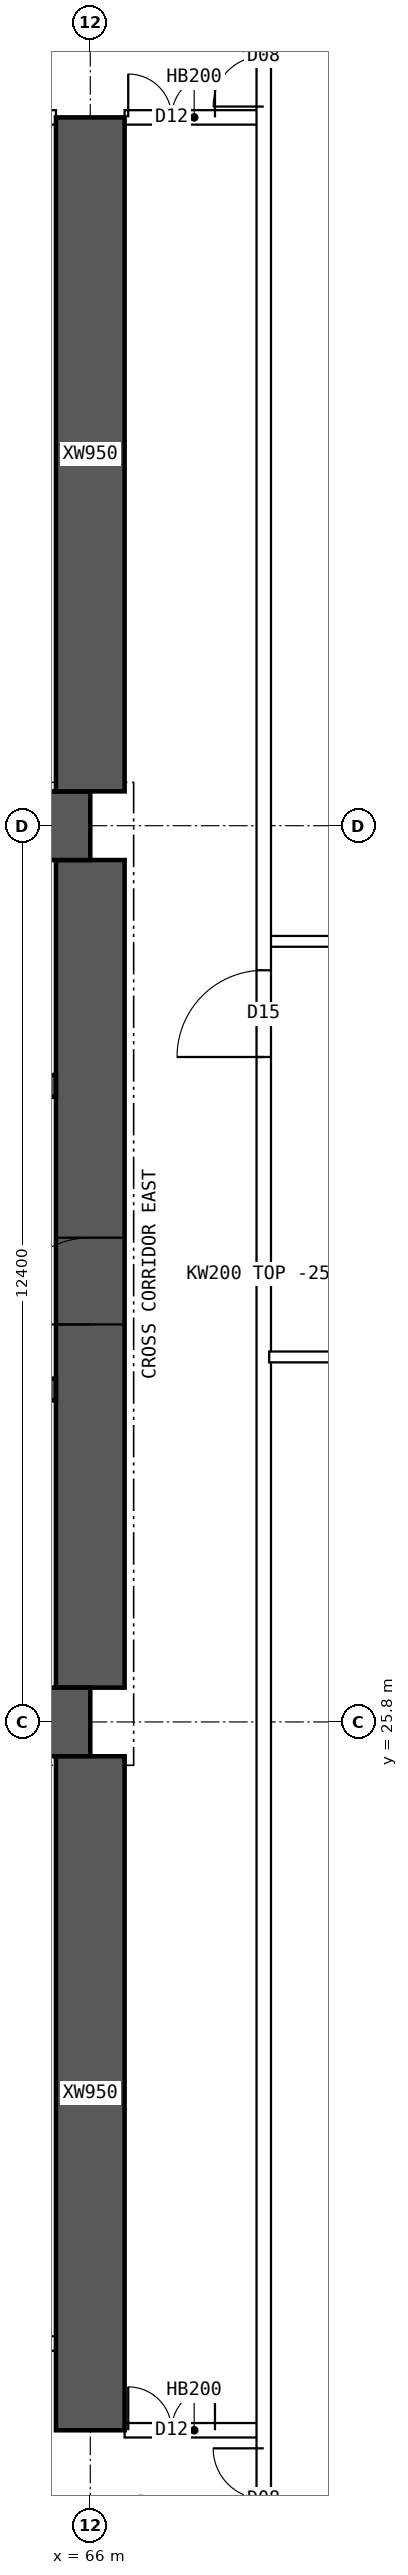
"""IFC4 building model, lengths in metres.
Left out: names, types, materials, properties, quantities, classifications, styles, units other than length and angle.
Written with IfcOpenShell. Run it as: python <this file> out.ifc"""

import sys

from ifc_helpers import new_model, si_unit, direction, frame, frame_2d, origin, place, context, subcontext, project, spatial, polyline, rectangle, outline, extrude, element, fill, save


model = new_model("IFC4")
c1 = context("Model", 3, precision=1e-05, world=origin(), true_north=direction((0.0, 1.0)))
c2 = subcontext(c1, "Body", "Model", "MODEL_VIEW")
j1 = project(units=[si_unit("LENGTHUNIT", "METRE"), si_unit("PLANEANGLEUNIT", "RADIAN")], contexts=[c1])
p1 = place(None, origin())
s1 = spatial("IfcSite", under=j1, at=p1, CompositionType="ELEMENT")
p2 = place(p1, origin())
s2 = spatial("IfcBuilding", under=s1, at=p2, CompositionType="ELEMENT")
p3 = place(p2, frame((0.0, 0.0, 106.9)))
s3 = spatial("IfcBuildingStorey", under=s2, at=p3, CompositionType="ELEMENT", Elevation=106.9)
for number, where, z_axis, x_axis in (
    (1, (18.0, 25.8, 0.0), (0.0, 0.0, 1.0), (1.0, 0.0, 0.0)),
    (2, (18.0, 38.2, 0.0), (0.0, 0.0, 1.0), (1.0, 0.0, 0.0)),
):
    element("IfcWall", number, at=place(p3, frame(where, z_axis=z_axis, x_axis=x_axis)), inside=s3, PredefinedType="SHEAR", context=c2, shape_type="SweptSolid", body=[
        extrude(rectangle(XDim=48.0, YDim=0.95, at=frame_2d((24.0, 0.0))), origin(), (0.0, 0.0, 1.0), 3.75),
    ])
p4 = place(p3, frame((66.0, 26.275, 0.0), z_axis=(0.0, 0.0, 1.0), x_axis=(0.0, 1.0, 0.0)))
e3 = element("IfcWall", 3, at=p4, inside=s3, PredefinedType="SHEAR", context=c2, shape_type="SweptSolid", body=[
    extrude(rectangle(XDim=11.45, YDim=0.95, at=frame_2d((5.725, 0.0))), origin(), (0.0, 0.0, 1.0), 3.75),
])
p5 = place(p4, frame((5.025, 0.0, 0.0)))
e4 = element("IfcOpeningElement", 4, at=p5, cuts=e3, PredefinedType="OPENING", context=c2, shape_type="SweptSolid", body=[
    extrude(rectangle(XDim=1.2, YDim=2.1, at=frame_2d((0.6, 1.05))), frame((0.0, 0.485, 0.0), z_axis=(0.0, -1.0, 0.0), x_axis=(1.0, 0.0, 0.0)), (0.0, 0.0, 1.0), 0.97),
])
p6 = place(p3, frame((18.475, 30.4, 0.0), z_axis=(0.0, 0.0, 1.0), x_axis=(1.0, 0.0, 0.0)))
e5 = element("IfcWall", 5, at=p6, inside=s3, PredefinedType="SHEAR", context=c2, shape_type="SweptSolid", body=[
    extrude(rectangle(XDim=47.05, YDim=0.3, at=frame_2d((23.525, 0.0))), origin(), (0.0, 0.0, 1.0), 3.75),
])
p7 = place(p6, frame((0.4, 0.0, 0.0)))
e6 = element("IfcOpeningElement", 6, at=p7, cuts=e5, PredefinedType="OPENING", context=c2, shape_type="SweptSolid", body=[
    extrude(rectangle(XDim=1.0, YDim=2.1, at=frame_2d((0.5, 1.05))), frame((0.0, 0.16, 0.0), z_axis=(0.0, -1.0, 0.0), x_axis=(1.0, 0.0, 0.0)), (0.0, 0.0, 1.0), 0.32),
])
p8 = place(p6, frame((45.65, 0.0, 0.0)))
e7 = element("IfcOpeningElement", 7, at=p8, cuts=e5, PredefinedType="OPENING", context=c2, shape_type="SweptSolid", body=[
    extrude(rectangle(XDim=1.0, YDim=2.1, at=frame_2d((0.5, 1.05))), frame((0.0, 0.16, 0.0), z_axis=(0.0, -1.0, 0.0), x_axis=(1.0, 0.0, 0.0)), (0.0, 0.0, 1.0), 0.32),
])
p9 = place(p6, frame((8.275, 0.0, 0.0)))
e8 = element("IfcOpeningElement", 8, at=p9, cuts=e5, PredefinedType="OPENING", context=c2, shape_type="SweptSolid", body=[
    extrude(rectangle(XDim=1.1, YDim=2.1, at=frame_2d((0.55, 1.05))), frame((0.0, 0.16, 0.0), z_axis=(0.0, -1.0, 0.0), x_axis=(1.0, 0.0, 0.0)), (0.0, 0.0, 1.0), 0.32),
])
p10 = place(p6, frame((10.875, 0.0, 0.0)))
e9 = element("IfcOpeningElement", 9, at=p10, cuts=e5, PredefinedType="OPENING", context=c2, shape_type="SweptSolid", body=[
    extrude(rectangle(XDim=1.1, YDim=2.1, at=frame_2d((0.55, 1.05))), frame((0.0, 0.16, 0.0), z_axis=(0.0, -1.0, 0.0), x_axis=(1.0, 0.0, 0.0)), (0.0, 0.0, 1.0), 0.32),
])
p11 = place(p6, frame((13.475, 0.0, 0.0)))
e10 = element("IfcOpeningElement", 10, at=p11, cuts=e5, PredefinedType="OPENING", context=c2, shape_type="SweptSolid", body=[
    extrude(rectangle(XDim=1.1, YDim=2.1, at=frame_2d((0.55, 1.05))), frame((0.0, 0.16, 0.0), z_axis=(0.0, -1.0, 0.0), x_axis=(1.0, 0.0, 0.0)), (0.0, 0.0, 1.0), 0.32),
])
p12 = place(p6, frame((16.075, 0.0, 0.0)))
e11 = element("IfcOpeningElement", 11, at=p12, cuts=e5, PredefinedType="OPENING", context=c2, shape_type="SweptSolid", body=[
    extrude(rectangle(XDim=1.1, YDim=2.1, at=frame_2d((0.55, 1.05))), frame((0.0, 0.16, 0.0), z_axis=(0.0, -1.0, 0.0), x_axis=(1.0, 0.0, 0.0)), (0.0, 0.0, 1.0), 0.32),
])
p13 = place(p6, frame((18.85, 0.0, 0.0)))
e12 = element("IfcOpeningElement", 12, at=p13, cuts=e5, PredefinedType="OPENING", context=c2, shape_type="SweptSolid", body=[
    extrude(rectangle(XDim=0.9, YDim=2.1, at=frame_2d((0.45, 1.05))), frame((0.0, 0.16, 0.0), z_axis=(0.0, -1.0, 0.0), x_axis=(1.0, 0.0, 0.0)), (0.0, 0.0, 1.0), 0.32),
])
p14 = place(p6, frame((30.142, 0.0, 0.0)))
e13 = element("IfcOpeningElement", 13, at=p14, cuts=e5, PredefinedType="OPENING", context=c2, shape_type="SweptSolid", body=[
    extrude(rectangle(XDim=1.1, YDim=2.1, at=frame_2d((0.55, 1.05))), frame((0.0, 0.16, 0.0), z_axis=(0.0, -1.0, 0.0), x_axis=(1.0, 0.0, 0.0)), (0.0, 0.0, 1.0), 0.32),
])
p15 = place(p6, frame((33.675, 0.0, 0.0)))
e14 = element("IfcOpeningElement", 14, at=p15, cuts=e5, PredefinedType="OPENING", context=c2, shape_type="SweptSolid", body=[
    extrude(rectangle(XDim=1.1, YDim=2.1, at=frame_2d((0.55, 1.05))), frame((0.0, 0.16, 0.0), z_axis=(0.0, -1.0, 0.0), x_axis=(1.0, 0.0, 0.0)), (0.0, 0.0, 1.0), 0.32),
])
p16 = place(p6, frame((37.208, 0.0, 0.0)))
e15 = element("IfcOpeningElement", 15, at=p16, cuts=e5, PredefinedType="OPENING", context=c2, shape_type="SweptSolid", body=[
    extrude(rectangle(XDim=1.1, YDim=2.1, at=frame_2d((0.55, 1.05))), frame((0.0, 0.16, 0.0), z_axis=(0.0, -1.0, 0.0), x_axis=(1.0, 0.0, 0.0)), (0.0, 0.0, 1.0), 0.32),
])
p17 = place(p3, frame((18.475, 34.6, 0.0), z_axis=(0.0, 0.0, 1.0), x_axis=(1.0, 0.0, 0.0)))
e16 = element("IfcWall", 16, at=p17, inside=s3, PredefinedType="SHEAR", context=c2, shape_type="SweptSolid", body=[
    extrude(rectangle(XDim=47.05, YDim=0.3, at=frame_2d((23.525, 0.0))), origin(), (0.0, 0.0, 1.0), 3.75),
])
p18 = place(p17, frame((0.9, 0.0, 0.0)))
e17 = element("IfcOpeningElement", 17, at=p18, cuts=e16, PredefinedType="OPENING", context=c2, shape_type="SweptSolid", body=[
    extrude(rectangle(XDim=1.1, YDim=2.1, at=frame_2d((0.55, 1.05))), frame((0.0, 0.16, 0.0), z_axis=(0.0, -1.0, 0.0), x_axis=(1.0, 0.0, 0.0)), (0.0, 0.0, 1.0), 0.32),
])
p19 = place(p17, frame((45.05, 0.0, 0.0)))
e18 = element("IfcOpeningElement", 18, at=p19, cuts=e16, PredefinedType="OPENING", context=c2, shape_type="SweptSolid", body=[
    extrude(rectangle(XDim=1.1, YDim=2.1, at=frame_2d((0.55, 1.05))), frame((0.0, 0.16, 0.0), z_axis=(0.0, -1.0, 0.0), x_axis=(1.0, 0.0, 0.0)), (0.0, 0.0, 1.0), 0.32),
])
p20 = place(p17, frame((4.125, 0.0, 0.0)))
e19 = element("IfcOpeningElement", 19, at=p20, cuts=e16, PredefinedType="OPENING", context=c2, shape_type="SweptSolid", body=[
    extrude(rectangle(XDim=0.9, YDim=2.1, at=frame_2d((0.45, 1.05))), frame((0.0, 0.16, 0.0), z_axis=(0.0, -1.0, 0.0), x_axis=(1.0, 0.0, 0.0)), (0.0, 0.0, 1.0), 0.32),
])
p21 = place(p17, frame((42.025, 0.0, 0.0)))
e20 = element("IfcOpeningElement", 20, at=p21, cuts=e16, PredefinedType="OPENING", context=c2, shape_type="SweptSolid", body=[
    extrude(rectangle(XDim=0.9, YDim=2.1, at=frame_2d((0.45, 1.05))), frame((0.0, 0.16, 0.0), z_axis=(0.0, -1.0, 0.0), x_axis=(1.0, 0.0, 0.0)), (0.0, 0.0, 1.0), 0.32),
])
p22 = place(p17, frame((8.9, 0.0, 0.0)))
e21 = element("IfcOpeningElement", 21, at=p22, cuts=e16, PredefinedType="OPENING", context=c2, shape_type="SweptSolid", body=[
    extrude(rectangle(XDim=0.9, YDim=2.1, at=frame_2d((0.45, 1.05))), frame((0.0, 0.16, 0.0), z_axis=(0.0, -1.0, 0.0), x_axis=(1.0, 0.0, 0.0)), (0.0, 0.0, 1.0), 0.32),
])
p23 = place(p17, frame((12.874, 0.0, 0.0)))
e22 = element("IfcOpeningElement", 22, at=p23, cuts=e16, PredefinedType="OPENING", context=c2, shape_type="SweptSolid", body=[
    extrude(rectangle(XDim=0.9, YDim=2.1, at=frame_2d((0.45, 1.05))), frame((0.0, 0.16, 0.0), z_axis=(0.0, -1.0, 0.0), x_axis=(1.0, 0.0, 0.0)), (0.0, 0.0, 1.0), 0.32),
])
p24 = place(p17, frame((16.521, 0.0, 0.0)))
e23 = element("IfcOpeningElement", 23, at=p24, cuts=e16, PredefinedType="OPENING", context=c2, shape_type="SweptSolid", body=[
    extrude(rectangle(XDim=0.9, YDim=2.1, at=frame_2d((0.45, 1.05))), frame((0.0, 0.16, 0.0), z_axis=(0.0, -1.0, 0.0), x_axis=(1.0, 0.0, 0.0)), (0.0, 0.0, 1.0), 0.32),
])
p25 = place(p17, frame((20.28, 0.0, 0.0)))
e24 = element("IfcOpeningElement", 24, at=p25, cuts=e16, PredefinedType="OPENING", context=c2, shape_type="SweptSolid", body=[
    extrude(rectangle(XDim=0.9, YDim=2.1, at=frame_2d((0.45, 1.05))), frame((0.0, 0.16, 0.0), z_axis=(0.0, -1.0, 0.0), x_axis=(1.0, 0.0, 0.0)), (0.0, 0.0, 1.0), 0.32),
])
p26 = place(p17, frame((24.686, 0.0, 0.0)))
e25 = element("IfcOpeningElement", 25, at=p26, cuts=e16, PredefinedType="OPENING", context=c2, shape_type="SweptSolid", body=[
    extrude(rectangle(XDim=0.9, YDim=2.1, at=frame_2d((0.45, 1.05))), frame((0.0, 0.16, 0.0), z_axis=(0.0, -1.0, 0.0), x_axis=(1.0, 0.0, 0.0)), (0.0, 0.0, 1.0), 0.32),
])
p27 = place(p17, frame((27.483, 0.0, 0.0)))
e26 = element("IfcOpeningElement", 26, at=p27, cuts=e16, PredefinedType="OPENING", context=c2, shape_type="SweptSolid", body=[
    extrude(rectangle(XDim=0.9, YDim=2.1, at=frame_2d((0.45, 1.05))), frame((0.0, 0.16, 0.0), z_axis=(0.0, -1.0, 0.0), x_axis=(1.0, 0.0, 0.0)), (0.0, 0.0, 1.0), 0.32),
])
p28 = place(p17, frame((29.856, 0.0, 0.0)))
e27 = element("IfcOpeningElement", 27, at=p28, cuts=e16, PredefinedType="OPENING", context=c2, shape_type="SweptSolid", body=[
    extrude(rectangle(XDim=0.9, YDim=2.1, at=frame_2d((0.45, 1.05))), frame((0.0, 0.16, 0.0), z_axis=(0.0, -1.0, 0.0), x_axis=(1.0, 0.0, 0.0)), (0.0, 0.0, 1.0), 0.32),
])
p29 = place(p17, frame((35.326, 0.0, 0.0)))
e28 = element("IfcOpeningElement", 28, at=p29, cuts=e16, PredefinedType="OPENING", context=c2, shape_type="SweptSolid", body=[
    extrude(rectangle(XDim=0.9, YDim=2.1, at=frame_2d((0.45, 1.05))), frame((0.0, 0.16, 0.0), z_axis=(0.0, -1.0, 0.0), x_axis=(1.0, 0.0, 0.0)), (0.0, 0.0, 1.0), 0.32),
])
for number, where, z_axis, x_axis in (
    (29, (66.0, 16.0, 0.0), (0.0, 0.0, 1.0), (0.0, 1.0, 0.0)),
    (30, (66.0, 38.675, 0.0), (0.0, 0.0, 1.0), (0.0, 1.0, 0.0)),
):
    element("IfcWall", number, at=place(p3, frame(where, z_axis=z_axis, x_axis=x_axis)), inside=s3, PredefinedType="SHEAR", context=c2, shape_type="SweptSolid", body=[
        extrude(rectangle(XDim=9.325, YDim=0.95, at=frame_2d((4.663, 0.0))), origin(), (0.0, 0.0, 1.0), 3.75),
    ])
p30 = place(p3, frame((66.475, 16.0, 0.0), z_axis=(0.0, 0.0, 1.0), x_axis=(1.0, 0.0, 0.0)))
e31 = element("IfcWall", 31, at=p30, inside=s3, PredefinedType="SOLIDWALL", context=c2, shape_type="SweptSolid", body=[
    extrude(rectangle(XDim=1.925, YDim=0.2, at=frame_2d((0.962, 0.0))), origin(), (0.0, 0.0, 1.0), 3.5),
])
p31 = place(p30, frame((0.05, 0.0, 0.0)))
e32 = element("IfcOpeningElement", 32, at=p31, cuts=e31, PredefinedType="OPENING", context=c2, shape_type="SweptSolid", body=[
    extrude(rectangle(XDim=1.2, YDim=2.1, at=frame_2d((0.6, 1.05))), frame((0.0, 0.11, 0.0), z_axis=(0.0, -1.0, 0.0), x_axis=(1.0, 0.0, 0.0)), (0.0, 0.0, 1.0), 0.22),
])
p32 = place(p3, frame((60.475, 48.0, 0.0), z_axis=(0.0, 0.0, 1.0), x_axis=(1.0, 0.0, 0.0)))
e33 = element("IfcWall", 33, at=p32, inside=s3, PredefinedType="SOLIDWALL", context=c2, shape_type="SweptSolid", body=[
    extrude(rectangle(XDim=5.05, YDim=0.2, at=frame_2d((2.525, 0.0))), origin(), (0.0, 0.0, 1.0), 3.5),
])
p33 = place(p32, frame((0.4, 0.0, 0.0)))
e34 = element("IfcOpeningElement", 34, at=p33, cuts=e33, PredefinedType="OPENING", context=c2, shape_type="SweptSolid", body=[
    extrude(rectangle(XDim=1.0, YDim=2.1, at=frame_2d((0.5, 1.05))), frame((0.0, 0.11, 0.0), z_axis=(0.0, -1.0, 0.0), x_axis=(1.0, 0.0, 0.0)), (0.0, 0.0, 1.0), 0.22),
])
p34 = place(p3, frame((66.475, 48.0, 0.0), z_axis=(0.0, 0.0, 1.0), x_axis=(1.0, 0.0, 0.0)))
e35 = element("IfcWall", 35, at=p34, inside=s3, PredefinedType="SOLIDWALL", context=c2, shape_type="SweptSolid", body=[
    extrude(rectangle(XDim=1.925, YDim=0.2, at=frame_2d((0.962, 0.0))), origin(), (0.0, 0.0, 1.0), 3.5),
])
p35 = place(p34, frame((0.05, 0.0, 0.0)))
e36 = element("IfcOpeningElement", 36, at=p35, cuts=e35, PredefinedType="OPENING", context=c2, shape_type="SweptSolid", body=[
    extrude(rectangle(XDim=1.2, YDim=2.1, at=frame_2d((0.6, 1.05))), frame((0.0, 0.11, 0.0), z_axis=(0.0, -1.0, 0.0), x_axis=(1.0, 0.0, 0.0)), (0.0, 0.0, 1.0), 0.22),
])
p36 = place(p3, frame((60.475, 17.2, 0.0), z_axis=(0.0, 0.0, 1.0), x_axis=(1.0, 0.0, 0.0)))
e37 = element("IfcWall", 37, at=p36, inside=s3, PredefinedType="SOLIDWALL", context=c2, shape_type="SweptSolid", body=[
    extrude(rectangle(XDim=5.05, YDim=0.2, at=frame_2d((2.525, 0.0))), origin(), (0.0, 0.0, 1.0), 3.5),
])
p37 = place(p36, frame((0.4, 0.0, 0.0)))
e38 = element("IfcOpeningElement", 38, at=p37, cuts=e37, PredefinedType="OPENING", context=c2, shape_type="SweptSolid", body=[
    extrude(rectangle(XDim=1.0, YDim=2.1, at=frame_2d((0.5, 1.05))), frame((0.0, 0.11, 0.0), z_axis=(0.0, -1.0, 0.0), x_axis=(1.0, 0.0, 0.0)), (0.0, 0.0, 1.0), 0.22),
])
p38 = place(p3, frame((68.475, 30.85, 0.0), z_axis=(0.0, 0.0, 1.0), x_axis=(1.0, 0.0, 0.0)))
e39 = element("IfcWall", 39, at=p38, inside=s3, PredefinedType="PARTITIONING", context=c2, shape_type="SweptSolid", body=[
    extrude(outline(polyline([(0.0, 0.0), (6.82, 0.0), (6.82, 3.5), (3.827, 3.5), (3.825, 3.05), (3.227, 3.05), (3.225, 3.5), (0.0, 3.5), (0.0, 0.0)])), frame((0.0, 0.075, 0.0), z_axis=(0.0, -1.0, 0.0), x_axis=(1.0, 0.0, 0.0)), (0.0, 0.0, 1.0), 0.15),
])
p39 = place(p3, frame((68.4, 9.405, 0.0), z_axis=(0.0, 0.0, 1.0), x_axis=(0.0, 1.0, 0.0)))
e40 = element("IfcWall", 40, at=p39, inside=s3, PredefinedType="SOLIDWALL", context=c2, shape_type="SweptSolid", body=[
    extrude(rectangle(XDim=45.189, YDim=0.2, at=frame_2d((22.595, 0.0))), origin(), (0.0, 0.0, 1.0), 3.5),
])
p40 = place(p39, frame((25.595, 0.0, 0.0)))
e41 = element("IfcOpeningElement", 41, at=p40, cuts=e40, PredefinedType="OPENING", context=c2, shape_type="SweptSolid", body=[
    extrude(rectangle(XDim=1.2, YDim=2.1, at=frame_2d((0.6, 1.05))), frame((0.0, 0.11, 0.0), z_axis=(0.0, -1.0, 0.0), x_axis=(1.0, 0.0, 0.0)), (0.0, 0.0, 1.0), 0.22),
])
p41 = place(p39, frame((4.945, 0.0, 0.0)))
e42 = element("IfcOpeningElement", 42, at=p41, cuts=e40, PredefinedType="OPENING", context=c2, shape_type="SweptSolid", body=[
    extrude(rectangle(XDim=1.4, YDim=2.1, at=frame_2d((0.7, 1.05))), frame((0.0, 0.11, 0.0), z_axis=(0.0, -1.0, 0.0), x_axis=(1.0, 0.0, 0.0)), (0.0, 0.0, 1.0), 0.22),
])
p42 = place(p39, frame((38.745, 0.0, 0.0)))
e43 = element("IfcOpeningElement", 43, at=p42, cuts=e40, PredefinedType="OPENING", context=c2, shape_type="SweptSolid", body=[
    extrude(rectangle(XDim=1.4, YDim=2.1, at=frame_2d((0.7, 1.05))), frame((0.0, 0.11, 0.0), z_axis=(0.0, -1.0, 0.0), x_axis=(1.0, 0.0, 0.0)), (0.0, 0.0, 1.0), 0.22),
])
p43 = place(p3, frame((68.475, 36.6, 0.0), z_axis=(0.0, 0.0, 1.0), x_axis=(1.0, 0.0, 0.0)))
e44 = element("IfcWall", 44, at=p43, inside=s3, PredefinedType="PARTITIONING", context=c2, shape_type="SweptSolid", body=[
    extrude(rectangle(XDim=6.82, YDim=0.15, at=frame_2d((3.41, 0.0))), origin(), (0.0, 0.0, 1.0), 3.5),
])
p44 = place(p5, origin())
e45 = element("IfcDoor", 45, at=p44, inside=s3, OperationType="SINGLE_SWING_LEFT", PredefinedType="DOOR", context=c2, shape_type="SweptSolid", body=[
    extrude(rectangle(XDim=1.2, YDim=2.1, at=frame_2d((0.6, 1.05))), frame((0.0, 0.025, 0.0), z_axis=(0.0, -1.0, 0.0), x_axis=(1.0, 0.0, 0.0)), (0.0, 0.0, 1.0), 0.05),
])
fill(e4, e45)
p45 = place(p31, origin())
e46 = element("IfcDoor", 46, at=p45, inside=s3, OperationType="DOUBLE_DOOR_SINGLE_SWING", PredefinedType="DOOR", context=c2, shape_type="SweptSolid", body=[
    extrude(rectangle(XDim=1.2, YDim=2.1, at=frame_2d((0.6, 1.05))), frame((0.0, 0.025, 0.0), z_axis=(0.0, -1.0, 0.0), x_axis=(1.0, 0.0, 0.0)), (0.0, 0.0, 1.0), 0.05),
])
fill(e32, e46)
p46 = place(p35, origin())
e47 = element("IfcDoor", 47, at=p46, inside=s3, OperationType="DOUBLE_DOOR_SINGLE_SWING", PredefinedType="DOOR", context=c2, shape_type="SweptSolid", body=[
    extrude(rectangle(XDim=1.2, YDim=2.1, at=frame_2d((0.6, 1.05))), frame((0.0, 0.025, 0.0), z_axis=(0.0, -1.0, 0.0), x_axis=(1.0, 0.0, 0.0)), (0.0, 0.0, 1.0), 0.05),
])
fill(e36, e47)
p47 = place(p40, origin())
e48 = element("IfcDoor", 48, at=p47, inside=s3, OperationType="SINGLE_SWING_LEFT", PredefinedType="DOOR", context=c2, shape_type="SweptSolid", body=[
    extrude(rectangle(XDim=1.2, YDim=2.1, at=frame_2d((0.6, 1.05))), frame((0.0, 0.025, 0.0), z_axis=(0.0, -1.0, 0.0), x_axis=(1.0, 0.0, 0.0)), (0.0, 0.0, 1.0), 0.05),
])
fill(e41, e48)
p48 = place(p41, origin())
e49 = element("IfcDoor", 49, at=p48, inside=s3, OperationType="DOUBLE_DOOR_SINGLE_SWING", PredefinedType="DOOR", context=c2, shape_type="SweptSolid", body=[
    extrude(rectangle(XDim=1.4, YDim=2.1, at=frame_2d((0.7, 1.05))), frame((0.0, 0.025, 0.0), z_axis=(0.0, -1.0, 0.0), x_axis=(1.0, 0.0, 0.0)), (0.0, 0.0, 1.0), 0.05),
])
fill(e42, e49)
p49 = place(p42, origin())
e50 = element("IfcDoor", 50, at=p49, inside=s3, OperationType="DOUBLE_DOOR_SINGLE_SWING", PredefinedType="DOOR", context=c2, shape_type="SweptSolid", body=[
    extrude(rectangle(XDim=1.4, YDim=2.1, at=frame_2d((0.7, 1.05))), frame((0.0, 0.025, 0.0), z_axis=(0.0, -1.0, 0.0), x_axis=(1.0, 0.0, 0.0)), (0.0, 0.0, 1.0), 0.05),
])
fill(e43, e50)
save(model, sys.argv[1])
